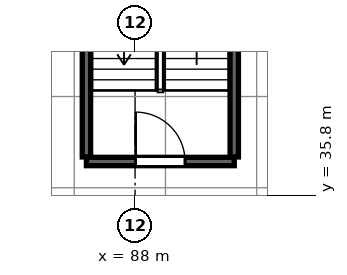
"""IFC4 building model, lengths in metres.
Left out: names, types, materials, properties, quantities, classifications, styles, units other than length and angle.
Written with IfcOpenShell. Run it as: python <this file> out.ifc"""

import sys

from ifc_helpers import new_model, si_unit, direction, frame, frame_2d, origin, place, context, subcontext, project, spatial, rectangle, extrude, source, transform, mapped, element, fill, save


model = new_model("IFC4")
c1 = context("Model", 3, precision=1e-05, world=origin(), true_north=direction((0.0, 1.0)))
c2 = subcontext(c1, "Body", "Model", "MODEL_VIEW")
j1 = project(units=[si_unit("LENGTHUNIT", "METRE"), si_unit("PLANEANGLEUNIT", "RADIAN")], contexts=[c1])
p1 = place(None, origin())
s1 = spatial("IfcSite", under=j1, at=p1, CompositionType="ELEMENT")
p2 = place(p1, origin())
s2 = spatial("IfcBuilding", under=s1, at=p2, CompositionType="ELEMENT")
p3 = place(p2, frame((0.0, 0.0, 18.0)))
s3 = spatial("IfcBuildingStorey", under=s2, at=p3, CompositionType="ELEMENT", Elevation=18.0)
m1 = source(origin(), c2, "Body", "SweptSolid", [
    extrude(rectangle(XDim=3.89, YDim=0.22, at=frame_2d((1.945, 0.0))), origin(), (0.0, 0.0, 1.0), 6.0),
])
p4 = place(p3, frame((86.72, 36.69, 0.0), z_axis=(0.0, 0.0, 1.0), x_axis=(1.0, 0.0, 0.0)))
e1 = element("IfcWall", 1, at=p4, inside=s3, PredefinedType="SOLIDWALL", context=c2, shape_type="MappedRepresentation", body=[
    mapped(m1, transform((0.0, 0.0, 0.0), scale=1.0)),
])
p5 = place(p4, frame((1.295, 0.0, 0.0)))
e2 = element("IfcOpeningElement", 2, at=p5, cuts=e1, PredefinedType="OPENING", context=c2, shape_type="SweptSolid", body=[
    extrude(rectangle(XDim=1.3, YDim=2.15, at=frame_2d((0.65, 1.075))), frame((0.0, 0.12, 0.0), z_axis=(0.0, -1.0, 0.0), x_axis=(1.0, 0.0, 0.0)), (0.0, 0.0, 1.0), 0.24),
])
m2 = source(origin(), c2, "Body", "SweptSolid", [
    extrude(rectangle(XDim=10.38, YDim=0.22, at=frame_2d((5.19, 0.0))), origin(), (0.0, 0.0, 1.0), 6.0),
])
for number, where, z_axis, x_axis in (
    (3, (86.72, 36.81, 0.0), (0.0, 0.0, 1.0), (0.0, 1.0, 0.0)),
    (4, (90.61, 36.81, 0.0), (0.0, 0.0, 1.0), (0.0, 1.0, 0.0)),
):
    element("IfcWall", number, at=place(p3, frame(where, z_axis=z_axis, x_axis=x_axis)), inside=s3, PredefinedType="SOLIDWALL", context=c2, shape_type="MappedRepresentation", body=[
        mapped(m2, transform((0.0, 0.0, 0.0), scale=1.0)),
    ])
m3 = source(origin(), c2, "Body", "SweptSolid", [
    extrude(rectangle(XDim=1.3, YDim=2.15, at=frame_2d((0.65, 1.075))), frame((0.0, 0.025, 0.0), z_axis=(0.0, -1.0, 0.0), x_axis=(1.0, 0.0, 0.0)), (0.0, 0.0, 1.0), 0.05),
])
p6 = place(p5, origin())
e5 = element("IfcDoor", 5, at=p6, inside=s3, OperationType="SINGLE_SWING_LEFT", PredefinedType="DOOR", context=c2, shape_type="MappedRepresentation", body=[
    mapped(m3, transform((0.0, 0.0, 0.0), scale=1.0)),
])
fill(e2, e5)
save(model, sys.argv[1])
